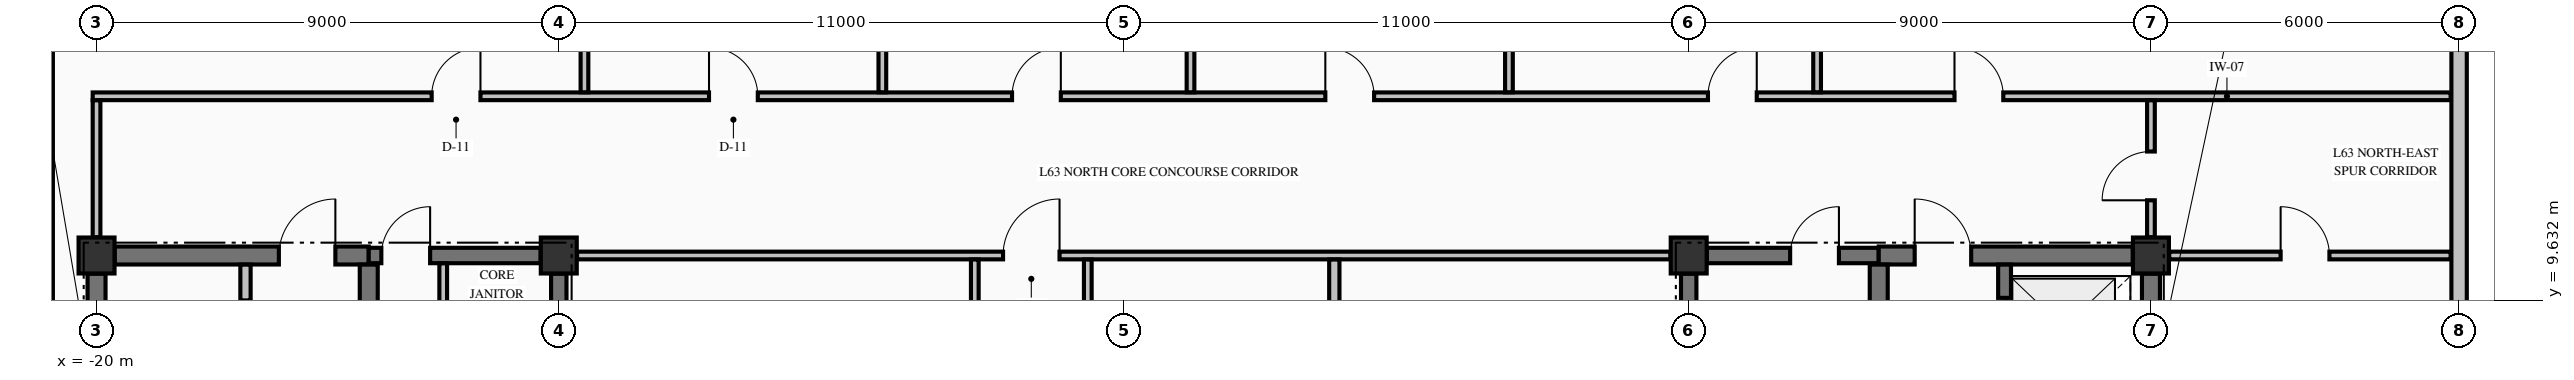
"""IFC4 building model, lengths in metres.
Left out: names, types, materials, properties, quantities, classifications, styles, units other than length and angle.
Written with IfcOpenShell. Run it as: python <this file> out.ifc"""

import sys

from ifc_helpers import new_model, si_unit, direction, frame, frame_2d, origin, origin_2d, place, context, subcontext, project, spatial, rectangle, extrude, element, fill, save


model = new_model("IFC4")
c1 = context("Model", 3, precision=1e-05, world=origin(), true_north=direction((0.0, 1.0)))
c2 = subcontext(c1, "Body", "Model", "MODEL_VIEW")
j1 = project(units=[si_unit("LENGTHUNIT", "METRE"), si_unit("PLANEANGLEUNIT", "RADIAN")], contexts=[c1])
p1 = place(None, origin())
s1 = spatial("IfcSite", under=j1, at=p1, CompositionType="ELEMENT")
p2 = place(p1, origin())
s2 = spatial("IfcBuilding", under=s1, at=p2, CompositionType="ELEMENT")
p3 = place(p2, frame((0.0, 0.0, 239.74)))
s3 = spatial("IfcBuildingStorey", under=s2, at=p3, CompositionType="ELEMENT", Elevation=239.74)
for number, where, z_axis, x_axis in (
    (1, (-20.0, 10.5, -0.25), (0.0, 0.0, 1.0), (1.0, 0.0, 0.0)),
    (2, (-11.0, 10.5, -0.25), (0.0, 0.0, 1.0), (1.0, 0.0, 0.0)),
    (3, (11.0, 10.5, -0.25), (0.0, 0.0, 1.0), (1.0, 0.0, 0.0)),
    (4, (20.0, 10.5, -0.25), (0.0, 0.0, 1.0), (1.0, 0.0, 0.0)),
):
    element("IfcColumn", number, at=place(p3, frame(where, z_axis=z_axis, x_axis=x_axis)), inside=s3, PredefinedType="COLUMN", context=c2, shape_type="SweptSolid", body=[
        extrude(rectangle(XDim=0.7, YDim=0.7, at=origin_2d()), origin(), (0.0, 0.0, 1.0), 3.23),
    ])
for number, where, z_axis, x_axis in (
    (5, (26.0, 9.455, 0.0), (0.0, 0.0, 1.0), (0.0, 1.0, 0.0)),
    (6, (-21.0, 17.545, 0.0), (0.0, 0.0, 1.0), (0.0, -1.0, 0.0)),
):
    element("IfcWall", number, at=place(p3, frame(where, z_axis=z_axis, x_axis=x_axis)), inside=s3, PredefinedType="STANDARD", context=c2, shape_type="SweptSolid", body=[
        extrude(rectangle(XDim=8.09, YDim=0.3, at=frame_2d((4.045, 0.0))), origin(), (0.0, 0.0, 1.0), 2.372),
    ])
p4 = place(p3, frame((-19.646, 10.5, 0.0), z_axis=(0.0, 0.0, 1.0), x_axis=(1.0, 0.0, 0.0)))
e7 = element("IfcWall", 7, at=p4, inside=s3, PredefinedType="SHEAR", context=c2, shape_type="SweptSolid", body=[
    extrude(rectangle(XDim=4.946, YDim=0.35, at=frame_2d((2.473, 0.0))), origin(), (0.0, 0.0, 1.0), 2.98),
])
p5 = place(p4, frame((3.196, 0.0, 0.0)))
e8 = element("IfcOpeningElement", 8, at=p5, cuts=e7, PredefinedType="OPENING", context=c2, shape_type="SweptSolid", body=[
    extrude(rectangle(XDim=1.1, YDim=2.15, at=frame_2d((0.55, 1.075))), frame((0.0, 0.185, 0.0), z_axis=(0.0, -1.0, 0.0), x_axis=(1.0, 0.0, 0.0)), (0.0, 0.0, 1.0), 0.37),
])
p6 = place(p3, frame((-14.7, 10.5, 0.0), z_axis=(0.0, 0.0, 1.0), x_axis=(1.0, 0.0, 0.0)))
e9 = element("IfcWall", 9, at=p6, inside=s3, PredefinedType="SHEAR", context=c2, shape_type="SweptSolid", body=[
    extrude(rectangle(XDim=3.346, YDim=0.3, at=frame_2d((1.673, 0.0))), origin(), (0.0, 0.0, 1.0), 2.98),
])
p7 = place(p6, frame((0.245, 0.0, 0.0)))
e10 = element("IfcOpeningElement", 10, at=p7, cuts=e9, PredefinedType="OPENING", context=c2, shape_type="SweptSolid", body=[
    extrude(rectangle(XDim=0.95, YDim=2.15, at=frame_2d((0.475, 1.075))), frame((0.0, 0.16, 0.0), z_axis=(0.0, -1.0, 0.0), x_axis=(1.0, 0.0, 0.0)), (0.0, 0.0, 1.0), 0.32),
])
p8 = place(p3, frame((11.354, 10.5, 0.0), z_axis=(0.0, 0.0, 1.0), x_axis=(1.0, 0.0, 0.0)))
e11 = element("IfcWall", 11, at=p8, inside=s3, PredefinedType="SHEAR", context=c2, shape_type="SweptSolid", body=[
    extrude(rectangle(XDim=3.346, YDim=0.3, at=frame_2d((1.673, 0.0))), origin(), (0.0, 0.0, 1.0), 2.98),
])
p9 = place(p8, frame((1.621, 0.0, 0.0)))
e12 = element("IfcOpeningElement", 12, at=p9, cuts=e11, PredefinedType="OPENING", context=c2, shape_type="SweptSolid", body=[
    extrude(rectangle(XDim=0.95, YDim=2.15, at=frame_2d((0.475, 1.075))), frame((0.0, 0.16, 0.0), z_axis=(0.0, -1.0, 0.0), x_axis=(1.0, 0.0, 0.0)), (0.0, 0.0, 1.0), 0.32),
])
p10 = place(p3, frame((14.7, 10.5, 0.0), z_axis=(0.0, 0.0, 1.0), x_axis=(1.0, 0.0, 0.0)))
e13 = element("IfcWall", 13, at=p10, inside=s3, PredefinedType="SHEAR", context=c2, shape_type="SweptSolid", body=[
    extrude(rectangle(XDim=4.946, YDim=0.35, at=frame_2d((2.473, 0.0))), origin(), (0.0, 0.0, 1.0), 2.98),
])
p11 = place(p10, frame((0.7, 0.0, 0.0)))
e14 = element("IfcOpeningElement", 14, at=p11, cuts=e13, PredefinedType="OPENING", context=c2, shape_type="SweptSolid", body=[
    extrude(rectangle(XDim=1.1, YDim=2.15, at=frame_2d((0.55, 1.075))), frame((0.0, 0.185, 0.0), z_axis=(0.0, -1.0, 0.0), x_axis=(1.0, 0.0, 0.0)), (0.0, 0.0, 1.0), 0.37),
])
p12 = place(p3, frame((-10.644, 10.5, 0.0), z_axis=(0.0, 0.0, 1.0), x_axis=(1.0, 0.0, 0.0)))
e15 = element("IfcWall", 15, at=p12, inside=s3, PredefinedType="PARTITIONING", context=c2, shape_type="SweptSolid", body=[
    extrude(rectangle(XDim=21.288, YDim=0.15, at=frame_2d((10.644, 0.0))), origin(), (0.0, 0.0, 1.0), 2.98),
])
p13 = place(p12, frame((8.294, 0.0, 0.0)))
e16 = element("IfcOpeningElement", 16, at=p13, cuts=e15, PredefinedType="OPENING", context=c2, shape_type="SweptSolid", body=[
    extrude(rectangle(XDim=1.1, YDim=2.15, at=frame_2d((0.55, 1.075))), frame((0.0, 0.085, 0.0), z_axis=(0.0, -1.0, 0.0), x_axis=(1.0, 0.0, 0.0)), (0.0, 0.0, 1.0), 0.17),
])
p14 = place(p3, frame((20.356, 10.5, 0.0), z_axis=(0.0, 0.0, 1.0), x_axis=(1.0, 0.0, 0.0)))
e17 = element("IfcWall", 17, at=p14, inside=s3, PredefinedType="PARTITIONING", context=c2, shape_type="SweptSolid", body=[
    extrude(rectangle(XDim=5.479, YDim=0.15, at=frame_2d((2.74, 0.0))), origin(), (0.0, 0.0, 1.0), 2.98),
])
p15 = place(p14, frame((2.169, 0.0, 0.0)))
e18 = element("IfcOpeningElement", 18, at=p15, cuts=e17, PredefinedType="OPENING", context=c2, shape_type="SweptSolid", body=[
    extrude(rectangle(XDim=0.95, YDim=2.15, at=frame_2d((0.475, 1.075))), frame((0.0, 0.085, 0.0), z_axis=(0.0, -1.0, 0.0), x_axis=(1.0, 0.0, 0.0)), (0.0, 0.0, 1.0), 0.17),
])
p16 = place(p3, frame((-20.075, 13.6, 0.0), z_axis=(0.0, 0.0, 1.0), x_axis=(1.0, 0.0, 0.0)))
e19 = element("IfcWall", 19, at=p16, inside=s3, PredefinedType="PARTITIONING", context=c2, shape_type="SweptSolid", body=[
    extrude(rectangle(XDim=45.91, YDim=0.15, at=frame_2d((22.955, 0.0))), origin(), (0.0, 0.0, 1.0), 2.98),
])
p17 = place(p16, frame((6.6, 0.0, 0.0)))
e20 = element("IfcOpeningElement", 20, at=p17, cuts=e19, PredefinedType="OPENING", context=c2, shape_type="SweptSolid", body=[
    extrude(rectangle(XDim=0.95, YDim=2.15, at=frame_2d((0.475, 1.075))), frame((0.0, 0.085, 0.0), z_axis=(0.0, -1.0, 0.0), x_axis=(1.0, 0.0, 0.0)), (0.0, 0.0, 1.0), 0.17),
])
p18 = place(p16, frame((12.0, 0.0, 0.0)))
e21 = element("IfcOpeningElement", 21, at=p18, cuts=e19, PredefinedType="OPENING", context=c2, shape_type="SweptSolid", body=[
    extrude(rectangle(XDim=0.95, YDim=2.15, at=frame_2d((0.475, 1.075))), frame((0.0, 0.085, 0.0), z_axis=(0.0, -1.0, 0.0), x_axis=(1.0, 0.0, 0.0)), (0.0, 0.0, 1.0), 0.17),
])
p19 = place(p16, frame((17.9, 0.0, 0.0)))
e22 = element("IfcOpeningElement", 22, at=p19, cuts=e19, PredefinedType="OPENING", context=c2, shape_type="SweptSolid", body=[
    extrude(rectangle(XDim=0.95, YDim=2.15, at=frame_2d((0.475, 1.075))), frame((0.0, 0.085, 0.0), z_axis=(0.0, -1.0, 0.0), x_axis=(1.0, 0.0, 0.0)), (0.0, 0.0, 1.0), 0.17),
])
p20 = place(p16, frame((24.0, 0.0, 0.0)))
e23 = element("IfcOpeningElement", 23, at=p20, cuts=e19, PredefinedType="OPENING", context=c2, shape_type="SweptSolid", body=[
    extrude(rectangle(XDim=0.95, YDim=2.15, at=frame_2d((0.475, 1.075))), frame((0.0, 0.085, 0.0), z_axis=(0.0, -1.0, 0.0), x_axis=(1.0, 0.0, 0.0)), (0.0, 0.0, 1.0), 0.17),
])
p21 = place(p16, frame((31.45, 0.0, 0.0)))
e24 = element("IfcOpeningElement", 24, at=p21, cuts=e19, PredefinedType="OPENING", context=c2, shape_type="SweptSolid", body=[
    extrude(rectangle(XDim=0.95, YDim=2.15, at=frame_2d((0.475, 1.075))), frame((0.0, 0.085, 0.0), z_axis=(0.0, -1.0, 0.0), x_axis=(1.0, 0.0, 0.0)), (0.0, 0.0, 1.0), 0.17),
])
p22 = place(p16, frame((36.25, 0.0, 0.0)))
e25 = element("IfcOpeningElement", 25, at=p22, cuts=e19, PredefinedType="OPENING", context=c2, shape_type="SweptSolid", body=[
    extrude(rectangle(XDim=0.95, YDim=2.15, at=frame_2d((0.475, 1.075))), frame((0.0, 0.085, 0.0), z_axis=(0.0, -1.0, 0.0), x_axis=(1.0, 0.0, 0.0)), (0.0, 0.0, 1.0), 0.17),
])
p23 = place(p3, frame((-20.0, 5.327, 0.0), z_axis=(0.0, 0.0, 1.0), x_axis=(0.0, 1.0, 0.0)))
e26 = element("IfcWall", 26, at=p23, inside=s3, PredefinedType="SHEAR", context=c2, shape_type="SweptSolid", body=[
    extrude(rectangle(XDim=4.819, YDim=0.35, at=frame_2d((2.41, 0.0))), origin(), (0.0, 0.0, 1.0), 2.98),
])
p24 = place(p3, frame((-14.7, 5.852, 0.0), z_axis=(0.0, 0.0, 1.0), x_axis=(0.0, 1.0, 0.0)))
e27 = element("IfcWall", 27, at=p24, inside=s3, PredefinedType="SHEAR", context=c2, shape_type="SweptSolid", body=[
    extrude(rectangle(XDim=4.471, YDim=0.35, at=frame_2d((2.235, 0.0))), origin(), (0.0, 0.0, 1.0), 2.98),
])
for number, where, z_axis, x_axis in (
    (28, (-11.0, 5.852, 0.0), (0.0, 0.0, 1.0), (0.0, 1.0, 0.0)),
    (29, (11.0, 5.852, 0.0), (0.0, 0.0, 1.0), (0.0, 1.0, 0.0)),
):
    element("IfcWall", number, at=place(p3, frame(where, z_axis=z_axis, x_axis=x_axis)), inside=s3, PredefinedType="SHEAR", context=c2, shape_type="SweptSolid", body=[
        extrude(rectangle(XDim=4.294, YDim=0.3, at=frame_2d((2.147, 0.0))), origin(), (0.0, 0.0, 1.0), 2.98),
    ])
p25 = place(p3, frame((14.7, 5.852, 0.0), z_axis=(0.0, 0.0, 1.0), x_axis=(0.0, 1.0, 0.0)))
e30 = element("IfcWall", 30, at=p25, inside=s3, PredefinedType="SHEAR", context=c2, shape_type="SweptSolid", body=[
    extrude(rectangle(XDim=4.471, YDim=0.35, at=frame_2d((2.235, 0.0))), origin(), (0.0, 0.0, 1.0), 2.98),
])
p26 = place(p3, frame((17.15, 7.877, 0.0), z_axis=(0.0, 0.0, 1.0), x_axis=(0.0, 1.0, 0.0)))
e31 = element("IfcWall", 31, at=p26, inside=s3, PredefinedType="SOLIDWALL", context=c2, shape_type="SweptSolid", body=[
    extrude(rectangle(XDim=2.446, YDim=0.25, at=frame_2d((1.223, 0.0))), origin(), (0.0, 0.0, 1.0), 2.98),
])
p27 = place(p26, frame((0.698, 0.0, 0.0)))
e32 = element("IfcOpeningElement", 32, at=p27, cuts=e31, PredefinedType="OPENING", context=c2, shape_type="SweptSolid", body=[
    extrude(rectangle(XDim=1.1, YDim=2.2, at=frame_2d((0.55, 1.1))), frame((0.0, 0.135, 0.0), z_axis=(0.0, -1.0, 0.0), x_axis=(1.0, 0.0, 0.0)), (0.0, 0.0, 1.0), 0.27),
])
p28 = place(p3, frame((20.0, 7.877, 0.0), z_axis=(0.0, 0.0, 1.0), x_axis=(0.0, 1.0, 0.0)))
e33 = element("IfcWall", 33, at=p28, inside=s3, PredefinedType="SHEAR", context=c2, shape_type="SweptSolid", body=[
    extrude(rectangle(XDim=2.269, YDim=0.35, at=frame_2d((1.135, 0.0))), origin(), (0.0, 0.0, 1.0), 2.98),
])
p29 = place(p3, frame((-20.0, 10.856, 0.0), z_axis=(0.0, 0.0, 1.0), x_axis=(0.0, 1.0, 0.0)))
e34 = element("IfcWall", 34, at=p29, inside=s3, PredefinedType="PARTITIONING", context=c2, shape_type="SweptSolid", body=[
    extrude(rectangle(XDim=2.666, YDim=0.15, at=frame_2d((1.333, 0.0))), origin(), (0.0, 0.0, 1.0), 2.57),
])
p30 = place(p3, frame((-17.1, 7.928, 0.0), z_axis=(0.0, 0.0, 1.0), x_axis=(0.0, 1.0, 0.0)))
e35 = element("IfcWall", 35, at=p30, inside=s3, PredefinedType="PARTITIONING", context=c2, shape_type="SweptSolid", body=[
    extrude(rectangle(XDim=2.394, YDim=0.2, at=frame_2d((1.197, 0.0))), origin(), (0.0, 0.0, 1.0), 2.98),
])
p31 = place(p30, frame((0.747, 0.0, 0.0)))
e36 = element("IfcOpeningElement", 36, at=p31, cuts=e35, PredefinedType="OPENING", context=c2, shape_type="SweptSolid", body=[
    extrude(rectangle(XDim=0.95, YDim=2.15, at=frame_2d((0.475, 1.075))), frame((0.0, 0.11, 0.0), z_axis=(0.0, -1.0, 0.0), x_axis=(1.0, 0.0, 0.0)), (0.0, 0.0, 1.0), 0.22),
])
p32 = place(p3, frame((-13.25, 5.853, 0.0), z_axis=(0.0, 0.0, 1.0), x_axis=(0.0, 1.0, 0.0)))
e37 = element("IfcWall", 37, at=p32, inside=s3, PredefinedType="PARTITIONING", context=c2, shape_type="SweptSolid", body=[
    extrude(rectangle(XDim=4.494, YDim=0.15, at=frame_2d((2.247, 0.0))), origin(), (0.0, 0.0, 1.0), 2.98),
])
p33 = place(p32, frame((1.472, 0.0, 0.0)))
e38 = element("IfcOpeningElement", 38, at=p33, cuts=e37, PredefinedType="OPENING", context=c2, shape_type="SweptSolid", body=[
    extrude(rectangle(XDim=0.95, YDim=2.15, at=frame_2d((0.475, 1.075))), frame((0.0, 0.085, 0.0), z_axis=(0.0, -1.0, 0.0), x_axis=(1.0, 0.0, 0.0)), (0.0, 0.0, 1.0), 0.17),
])
for number, where, z_axis, x_axis in (
    (39, (-10.5, 13.678, 0.0), (0.0, 0.0, 1.0), (0.0, 1.0, 0.0)),
    (40, (-4.7, 13.678, 0.0), (0.0, 0.0, 1.0), (0.0, 1.0, 0.0)),
):
    element("IfcWall", number, at=place(p3, frame(where, z_axis=z_axis, x_axis=x_axis)), inside=s3, PredefinedType="PARTITIONING", context=c2, shape_type="SweptSolid", body=[
        extrude(rectangle(XDim=9.657, YDim=0.15, at=frame_2d((4.829, 0.0))), origin(), (0.0, 0.0, 1.0), 2.98),
    ])
for number, where, z_axis, x_axis in (
    (41, (-2.9, 2.978, 0.0), (0.0, 0.0, 1.0), (0.0, 1.0, 0.0)),
    (42, (-0.7, 2.978, 0.0), (0.0, 0.0, 1.0), (0.0, 1.0, 0.0)),
):
    element("IfcWall", number, at=place(p3, frame(where, z_axis=z_axis, x_axis=x_axis)), inside=s3, PredefinedType="PARTITIONING", context=c2, shape_type="SweptSolid", body=[
        extrude(rectangle(XDim=7.444, YDim=0.15, at=frame_2d((3.722, 0.0))), origin(), (0.0, 0.0, 1.0), 2.98),
    ])
p34 = place(p3, frame((1.3, 13.678, 0.0), z_axis=(0.0, 0.0, 1.0), x_axis=(0.0, 1.0, 0.0)))
e43 = element("IfcWall", 43, at=p34, inside=s3, PredefinedType="PARTITIONING", context=c2, shape_type="SweptSolid", body=[
    extrude(rectangle(XDim=9.657, YDim=0.15, at=frame_2d((4.829, 0.0))), origin(), (0.0, 0.0, 1.0), 2.98),
])
p35 = place(p3, frame((4.1, 2.978, 0.0), z_axis=(0.0, 0.0, 1.0), x_axis=(0.0, 1.0, 0.0)))
e44 = element("IfcWall", 44, at=p35, inside=s3, PredefinedType="PARTITIONING", context=c2, shape_type="SweptSolid", body=[
    extrude(rectangle(XDim=7.444, YDim=0.2, at=frame_2d((3.722, 0.0))), origin(), (0.0, 0.0, 1.0), 2.98),
])
for number, where, z_axis, x_axis in (
    (45, (7.5, 13.678, 0.0), (0.0, 0.0, 1.0), (0.0, 1.0, 0.0)),
    (46, (13.5, 13.678, 0.0), (0.0, 0.0, 1.0), (0.0, 1.0, 0.0)),
):
    element("IfcWall", number, at=place(p3, frame(where, z_axis=z_axis, x_axis=x_axis)), inside=s3, PredefinedType="PARTITIONING", context=c2, shape_type="SweptSolid", body=[
        extrude(rectangle(XDim=9.657, YDim=0.15, at=frame_2d((4.829, 0.0))), origin(), (0.0, 0.0, 1.0), 2.98),
    ])
p36 = place(p3, frame((20.0, 10.856, 0.0), z_axis=(0.0, 0.0, 1.0), x_axis=(0.0, 1.0, 0.0)))
e47 = element("IfcWall", 47, at=p36, inside=s3, PredefinedType="PARTITIONING", context=c2, shape_type="SweptSolid", body=[
    extrude(rectangle(XDim=2.666, YDim=0.15, at=frame_2d((1.333, 0.0))), origin(), (0.0, 0.0, 1.0), 2.98),
])
p37 = place(p36, frame((0.719, 0.0, 0.0)))
e48 = element("IfcOpeningElement", 48, at=p37, cuts=e47, PredefinedType="OPENING", context=c2, shape_type="SweptSolid", body=[
    extrude(rectangle(XDim=0.95, YDim=2.15, at=frame_2d((0.475, 1.075))), frame((0.0, 0.085, 0.0), z_axis=(0.0, -1.0, 0.0), x_axis=(1.0, 0.0, 0.0)), (0.0, 0.0, 1.0), 0.17),
])
p38 = place(p7, origin())
e49 = element("IfcDoor", 49, at=p38, inside=s3, OperationType="SINGLE_SWING_RIGHT", PredefinedType="DOOR", context=c2, shape_type="SweptSolid", body=[
    extrude(rectangle(XDim=0.95, YDim=2.15, at=frame_2d((0.475, 1.075))), frame((0.0, 0.025, 0.0), z_axis=(0.0, -1.0, 0.0), x_axis=(1.0, 0.0, 0.0)), (0.0, 0.0, 1.0), 0.05),
])
fill(e10, e49)
p39 = place(p9, origin())
e50 = element("IfcDoor", 50, at=p39, inside=s3, OperationType="SINGLE_SWING_RIGHT", PredefinedType="DOOR", context=c2, shape_type="SweptSolid", body=[
    extrude(rectangle(XDim=0.95, YDim=2.15, at=frame_2d((0.475, 1.075))), frame((0.0, 0.025, 0.0), z_axis=(0.0, -1.0, 0.0), x_axis=(1.0, 0.0, 0.0)), (0.0, 0.0, 1.0), 0.05),
])
fill(e12, e50)
p40 = place(p5, origin())
e51 = element("IfcDoor", 51, at=p40, inside=s3, OperationType="SINGLE_SWING_RIGHT", PredefinedType="DOOR", context=c2, shape_type="SweptSolid", body=[
    extrude(rectangle(XDim=1.1, YDim=2.15, at=frame_2d((0.55, 1.075))), frame((0.0, 0.025, 0.0), z_axis=(0.0, -1.0, 0.0), x_axis=(1.0, 0.0, 0.0)), (0.0, 0.0, 1.0), 0.05),
])
fill(e8, e51)
p41 = place(p27, origin())
e52 = element("IfcDoor", 52, at=p41, inside=s3, OperationType="SLIDING_TO_RIGHT", PredefinedType="DOOR", context=c2, shape_type="SweptSolid", body=[
    extrude(rectangle(XDim=1.1, YDim=2.2, at=frame_2d((0.55, 1.1))), frame((0.0, 0.025, 0.0), z_axis=(0.0, -1.0, 0.0), x_axis=(1.0, 0.0, 0.0)), (0.0, 0.0, 1.0), 0.05),
])
fill(e32, e52)
p42 = place(p11, origin())
e53 = element("IfcDoor", 53, at=p42, inside=s3, OperationType="SINGLE_SWING_LEFT", PredefinedType="DOOR", context=c2, shape_type="SweptSolid", body=[
    extrude(rectangle(XDim=1.1, YDim=2.15, at=frame_2d((0.55, 1.075))), frame((0.0, 0.025, 0.0), z_axis=(0.0, -1.0, 0.0), x_axis=(1.0, 0.0, 0.0)), (0.0, 0.0, 1.0), 0.05),
])
fill(e14, e53)
p43 = place(p13, origin())
e54 = element("IfcDoor", 54, at=p43, inside=s3, OperationType="SINGLE_SWING_RIGHT", PredefinedType="DOOR", context=c2, shape_type="SweptSolid", body=[
    extrude(rectangle(XDim=1.1, YDim=2.15, at=frame_2d((0.55, 1.075))), frame((0.0, 0.025, 0.0), z_axis=(0.0, -1.0, 0.0), x_axis=(1.0, 0.0, 0.0)), (0.0, 0.0, 1.0), 0.05),
])
fill(e16, e54)
p44 = place(p17, origin())
e55 = element("IfcDoor", 55, at=p44, inside=s3, OperationType="SINGLE_SWING_RIGHT", PredefinedType="DOOR", context=c2, shape_type="SweptSolid", body=[
    extrude(rectangle(XDim=0.95, YDim=2.15, at=frame_2d((0.475, 1.075))), frame((0.0, 0.025, 0.0), z_axis=(0.0, -1.0, 0.0), x_axis=(1.0, 0.0, 0.0)), (0.0, 0.0, 1.0), 0.05),
])
fill(e20, e55)
p45 = place(p18, origin())
e56 = element("IfcDoor", 56, at=p45, inside=s3, OperationType="SINGLE_SWING_LEFT", PredefinedType="DOOR", context=c2, shape_type="SweptSolid", body=[
    extrude(rectangle(XDim=0.95, YDim=2.15, at=frame_2d((0.475, 1.075))), frame((0.0, 0.025, 0.0), z_axis=(0.0, -1.0, 0.0), x_axis=(1.0, 0.0, 0.0)), (0.0, 0.0, 1.0), 0.05),
])
fill(e21, e56)
p46 = place(p19, origin())
e57 = element("IfcDoor", 57, at=p46, inside=s3, OperationType="SINGLE_SWING_RIGHT", PredefinedType="DOOR", context=c2, shape_type="SweptSolid", body=[
    extrude(rectangle(XDim=0.95, YDim=2.15, at=frame_2d((0.475, 1.075))), frame((0.0, 0.025, 0.0), z_axis=(0.0, -1.0, 0.0), x_axis=(1.0, 0.0, 0.0)), (0.0, 0.0, 1.0), 0.05),
])
fill(e22, e57)
p47 = place(p20, origin())
e58 = element("IfcDoor", 58, at=p47, inside=s3, OperationType="SINGLE_SWING_LEFT", PredefinedType="DOOR", context=c2, shape_type="SweptSolid", body=[
    extrude(rectangle(XDim=0.95, YDim=2.15, at=frame_2d((0.475, 1.075))), frame((0.0, 0.025, 0.0), z_axis=(0.0, -1.0, 0.0), x_axis=(1.0, 0.0, 0.0)), (0.0, 0.0, 1.0), 0.05),
])
fill(e23, e58)
p48 = place(p21, origin())
e59 = element("IfcDoor", 59, at=p48, inside=s3, OperationType="SINGLE_SWING_RIGHT", PredefinedType="DOOR", context=c2, shape_type="SweptSolid", body=[
    extrude(rectangle(XDim=0.95, YDim=2.15, at=frame_2d((0.475, 1.075))), frame((0.0, 0.025, 0.0), z_axis=(0.0, -1.0, 0.0), x_axis=(1.0, 0.0, 0.0)), (0.0, 0.0, 1.0), 0.05),
])
fill(e24, e59)
p49 = place(p22, origin())
e60 = element("IfcDoor", 60, at=p49, inside=s3, OperationType="SINGLE_SWING_LEFT", PredefinedType="DOOR", context=c2, shape_type="SweptSolid", body=[
    extrude(rectangle(XDim=0.95, YDim=2.15, at=frame_2d((0.475, 1.075))), frame((0.0, 0.025, 0.0), z_axis=(0.0, -1.0, 0.0), x_axis=(1.0, 0.0, 0.0)), (0.0, 0.0, 1.0), 0.05),
])
fill(e25, e60)
p50 = place(p37, origin())
e61 = element("IfcDoor", 61, at=p50, inside=s3, OperationType="SINGLE_SWING_LEFT", PredefinedType="DOOR", context=c2, shape_type="SweptSolid", body=[
    extrude(rectangle(XDim=0.95, YDim=2.15, at=frame_2d((0.475, 1.075))), frame((0.0, 0.025, 0.0), z_axis=(0.0, -1.0, 0.0), x_axis=(1.0, 0.0, 0.0)), (0.0, 0.0, 1.0), 0.05),
])
fill(e48, e61)
p51 = place(p15, origin())
e62 = element("IfcDoor", 62, at=p51, inside=s3, OperationType="SINGLE_SWING_LEFT", PredefinedType="DOOR", context=c2, shape_type="SweptSolid", body=[
    extrude(rectangle(XDim=0.95, YDim=2.15, at=frame_2d((0.475, 1.075))), frame((0.0, 0.025, 0.0), z_axis=(0.0, -1.0, 0.0), x_axis=(1.0, 0.0, 0.0)), (0.0, 0.0, 1.0), 0.05),
])
fill(e18, e62)
save(model, sys.argv[1])
